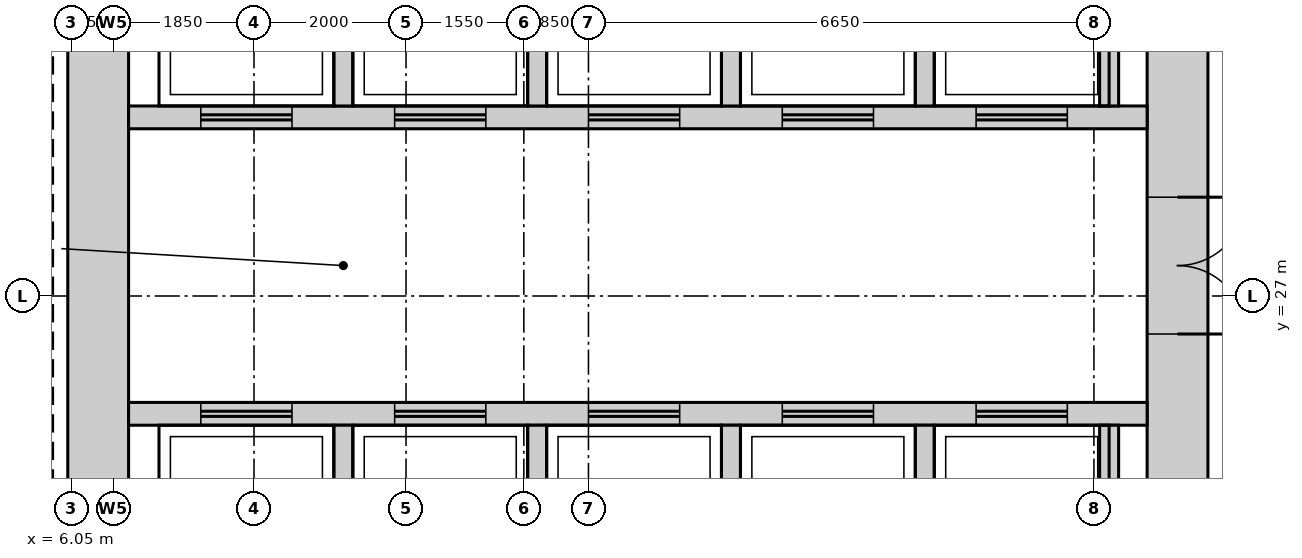
"""IFC4 building model, lengths in metres.
Left out: names, types, materials, properties, quantities, classifications, styles, units other than length and angle.
Written with IfcOpenShell. Run it as: python <this file> out.ifc"""

import sys

from ifc_helpers import new_model, si_unit, direction, frame, frame_2d, origin, place, context, subcontext, project, spatial, rectangle, extrude, source, transform, mapped, element, fill, save


model = new_model("IFC4")
c1 = context("Model", 3, precision=1e-05, world=origin(), true_north=direction((0.0, 1.0)))
c2 = subcontext(c1, "Body", "Model", "MODEL_VIEW")
j1 = project(units=[si_unit("LENGTHUNIT", "METRE"), si_unit("PLANEANGLEUNIT", "RADIAN")], contexts=[c1])
p1 = place(None, origin())
s1 = spatial("IfcSite", under=j1, at=p1, CompositionType="ELEMENT")
p2 = place(p1, origin())
s2 = spatial("IfcBuilding", under=s1, at=p2, CompositionType="ELEMENT")
p3 = place(p2, frame((0.0, 0.0, 176.7)))
s3 = spatial("IfcBuildingStorey", under=s2, at=p3, CompositionType="ELEMENT", Elevation=176.7)
m1 = source(origin(), c2, "Body", "SweptSolid", [
    extrude(rectangle(XDim=22.4, YDim=0.8, at=frame_2d((11.2, 0.0))), origin(), (0.0, 0.0, 1.0), 3.75),
])
p4 = place(p3, frame((20.6, 15.8, 0.0), z_axis=(0.0, 0.0, 1.0), x_axis=(0.0, 1.0, 0.0)))
e1 = element("IfcWall", 1, at=p4, inside=s3, PredefinedType="SHEAR", context=c2, shape_type="MappedRepresentation", body=[
    mapped(m1, transform((0.0, 0.0, 0.0))),
])
m2 = source(origin(), c2, "Body", "SweptSolid", [
    extrude(rectangle(XDim=1.8, YDim=2.1, at=frame_2d((0.9, 1.05))), frame((0.0, 0.41, 0.0), z_axis=(0.0, -1.0, 0.0), x_axis=(1.0, 0.0, 0.0)), (0.0, 0.0, 1.0), 0.82),
])
p5 = place(p4, frame((10.7, 0.0, 0.0)))
e2 = element("IfcOpeningElement", 2, at=p5, cuts=e1, PredefinedType="OPENING", context=c2, shape_type="MappedRepresentation", body=[
    mapped(m2, transform((0.0, 0.0, 0.0))),
])
m3 = source(origin(), c2, "Body", "SweptSolid", [
    extrude(rectangle(XDim=0.9, YDim=2.1, at=frame_2d((0.45, 1.05))), frame((0.0, 0.41, 0.0), z_axis=(0.0, -1.0, 0.0), x_axis=(1.0, 0.0, 0.0)), (0.0, 0.0, 1.0), 0.82),
])
p6 = place(p4, frame((0.35, 0.0, 0.0)))
e3 = element("IfcOpeningElement", 3, at=p6, cuts=e1, PredefinedType="OPENING", context=c2, shape_type="MappedRepresentation", body=[
    mapped(m3, transform((0.0, 0.0, 0.0))),
])
p7 = place(p4, frame((3.9, 0.0, 0.0)))
e4 = element("IfcOpeningElement", 4, at=p7, cuts=e1, PredefinedType="OPENING", context=c2, shape_type="MappedRepresentation", body=[
    mapped(m3, transform((0.0, 0.0, 0.0))),
])
p8 = place(p3, frame((6.4, 15.8, 0.0), z_axis=(0.0, 0.0, 1.0), x_axis=(0.0, 1.0, 0.0)))
e5 = element("IfcWall", 5, at=p8, inside=s3, PredefinedType="SHEAR", context=c2, shape_type="MappedRepresentation", body=[
    mapped(m1, transform((0.0, 0.0, 0.0))),
])
m4 = source(origin(), c2, "Body", "SweptSolid", [
    extrude(rectangle(XDim=13.4, YDim=0.3, at=frame_2d((6.7, 0.0))), origin(), (0.0, 0.0, 1.0), 3.75),
])
p9 = place(p3, frame((6.8, 29.35, 0.0), z_axis=(0.0, 0.0, 1.0), x_axis=(1.0, 0.0, 0.0)))
e6 = element("IfcWall", 6, at=p9, inside=s3, PredefinedType="STANDARD", context=c2, shape_type="MappedRepresentation", body=[
    mapped(m4, transform((0.0, 0.0, 0.0))),
])
m5 = source(origin(), c2, "Body", "SweptSolid", [
    extrude(rectangle(XDim=1.2, YDim=2.1, at=frame_2d((0.6, 1.05))), frame((0.0, 0.16, 0.0), z_axis=(0.0, -1.0, 0.0), x_axis=(1.0, 0.0, 0.0)), (0.0, 0.0, 1.0), 0.32),
])
p10 = place(p9, frame((0.95, 0.0, 0.0)))
e7 = element("IfcOpeningElement", 7, at=p10, cuts=e6, PredefinedType="OPENING", context=c2, shape_type="MappedRepresentation", body=[
    mapped(m5, transform((0.0, 0.0, 0.0))),
])
p11 = place(p9, frame((3.5, 0.0, 0.0)))
e8 = element("IfcOpeningElement", 8, at=p11, cuts=e6, PredefinedType="OPENING", context=c2, shape_type="MappedRepresentation", body=[
    mapped(m5, transform((0.0, 0.0, 0.0))),
])
p12 = place(p9, frame((6.05, 0.0, 0.0)))
e9 = element("IfcOpeningElement", 9, at=p12, cuts=e6, PredefinedType="OPENING", context=c2, shape_type="MappedRepresentation", body=[
    mapped(m5, transform((0.0, 0.0, 0.0))),
])
p13 = place(p9, frame((8.6, 0.0, 0.0)))
e10 = element("IfcOpeningElement", 10, at=p13, cuts=e6, PredefinedType="OPENING", context=c2, shape_type="MappedRepresentation", body=[
    mapped(m5, transform((0.0, 0.0, 0.0))),
])
p14 = place(p9, frame((11.15, 0.0, 0.0)))
e11 = element("IfcOpeningElement", 11, at=p14, cuts=e6, PredefinedType="OPENING", context=c2, shape_type="MappedRepresentation", body=[
    mapped(m5, transform((0.0, 0.0, 0.0))),
])
p15 = place(p3, frame((6.8, 25.45, 0.0), z_axis=(0.0, 0.0, 1.0), x_axis=(1.0, 0.0, 0.0)))
e12 = element("IfcWall", 12, at=p15, inside=s3, PredefinedType="STANDARD", context=c2, shape_type="MappedRepresentation", body=[
    mapped(m4, transform((0.0, 0.0, 0.0))),
])
p16 = place(p15, frame((0.95, 0.0, 0.0)))
e13 = element("IfcOpeningElement", 13, at=p16, cuts=e12, PredefinedType="OPENING", context=c2, shape_type="MappedRepresentation", body=[
    mapped(m5, transform((0.0, 0.0, 0.0))),
])
p17 = place(p15, frame((3.5, 0.0, 0.0)))
e14 = element("IfcOpeningElement", 14, at=p17, cuts=e12, PredefinedType="OPENING", context=c2, shape_type="MappedRepresentation", body=[
    mapped(m5, transform((0.0, 0.0, 0.0))),
])
p18 = place(p15, frame((6.05, 0.0, 0.0)))
e15 = element("IfcOpeningElement", 15, at=p18, cuts=e12, PredefinedType="OPENING", context=c2, shape_type="MappedRepresentation", body=[
    mapped(m5, transform((0.0, 0.0, 0.0))),
])
p19 = place(p15, frame((8.6, 0.0, 0.0)))
e16 = element("IfcOpeningElement", 16, at=p19, cuts=e12, PredefinedType="OPENING", context=c2, shape_type="MappedRepresentation", body=[
    mapped(m5, transform((0.0, 0.0, 0.0))),
])
p20 = place(p15, frame((11.15, 0.0, 0.0)))
e17 = element("IfcOpeningElement", 17, at=p20, cuts=e12, PredefinedType="OPENING", context=c2, shape_type="MappedRepresentation", body=[
    mapped(m5, transform((0.0, 0.0, 0.0))),
])
m6 = source(origin(), c2, "Body", "SweptSolid", [
    extrude(rectangle(XDim=2.4, YDim=0.25, at=frame_2d((1.2, 0.0))), origin(), (0.0, 0.0, 1.0), 3.75),
])
for number, where, z_axis, x_axis in (
    (18, (17.275, 29.5, 0.0), (0.0, 0.0, 1.0), (0.0, 1.0, 0.0)),
    (19, (19.7, 29.5, 0.0), (0.0, 0.0, 1.0), (0.0, 1.0, 0.0)),
    (20, (9.625, 29.5, 0.0), (0.0, 0.0, 1.0), (0.0, 1.0, 0.0)),
    (21, (12.175, 29.5, 0.0), (0.0, 0.0, 1.0), (0.0, 1.0, 0.0)),
    (22, (14.725, 29.5, 0.0), (0.0, 0.0, 1.0), (0.0, 1.0, 0.0)),
):
    element("IfcWall", number, at=place(p3, frame(where, z_axis=z_axis, x_axis=x_axis)), inside=s3, PredefinedType="STANDARD", context=c2, shape_type="MappedRepresentation", body=[
        mapped(m6, transform((0.0, 0.0, 0.0))),
    ])
m7 = source(origin(), c2, "Body", "SweptSolid", [
    extrude(rectangle(XDim=2.4, YDim=0.25, at=frame_2d((1.2, 0.0))), origin(), (0.0, 0.0, 1.0), 3.75),
])
for number, where, z_axis, x_axis in (
    (23, (17.275, 22.9, 0.0), (0.0, 0.0, 1.0), (0.0, 1.0, 0.0)),
    (24, (19.7, 22.9, 0.0), (0.0, 0.0, 1.0), (0.0, 1.0, 0.0)),
    (25, (9.625, 22.9, 0.0), (0.0, 0.0, 1.0), (0.0, 1.0, 0.0)),
    (26, (12.175, 22.9, 0.0), (0.0, 0.0, 1.0), (0.0, 1.0, 0.0)),
    (27, (14.725, 22.9, 0.0), (0.0, 0.0, 1.0), (0.0, 1.0, 0.0)),
):
    element("IfcWall", number, at=place(p3, frame(where, z_axis=z_axis, x_axis=x_axis)), inside=s3, PredefinedType="STANDARD", context=c2, shape_type="MappedRepresentation", body=[
        mapped(m7, transform((0.0, 0.0, 0.0))),
    ])
m8 = source(origin(), c2, "Body", "SweptSolid", [
    extrude(rectangle(XDim=1.8, YDim=2.1, at=frame_2d((0.9, 1.05))), frame((0.0, 0.35, 0.0), z_axis=(0.0, -1.0, 0.0), x_axis=(1.0, 0.0, 0.0)), (0.0, 0.0, 1.0), 0.7),
])
p21 = place(p5, origin())
e28 = element("IfcDoor", 28, at=p21, inside=s3, OperationType="DOUBLE_DOOR_SINGLE_SWING", PredefinedType="DOOR", context=c2, shape_type="MappedRepresentation", body=[
    mapped(m8, transform((0.0, 0.0, 0.0))),
])
fill(e2, e28)
m9 = source(origin(), c2, "Body", "SweptSolid", [
    extrude(rectangle(XDim=1.2, YDim=2.1, at=frame_2d((0.6, 1.05))), frame((0.0, 0.025, 0.0), z_axis=(0.0, -1.0, 0.0), x_axis=(1.0, 0.0, 0.0)), (0.0, 0.0, 1.0), 0.05),
])
p22 = place(p16, origin())
e29 = element("IfcDoor", 29, at=p22, inside=s3, OperationType="DOUBLE_DOOR_SLIDING", PredefinedType="DOOR", context=c2, shape_type="MappedRepresentation", body=[
    mapped(m9, transform((0.0, 0.0, 0.0))),
])
fill(e13, e29)
p23 = place(p17, origin())
e30 = element("IfcDoor", 30, at=p23, inside=s3, OperationType="DOUBLE_DOOR_SLIDING", PredefinedType="DOOR", context=c2, shape_type="MappedRepresentation", body=[
    mapped(m9, transform((0.0, 0.0, 0.0))),
])
fill(e14, e30)
p24 = place(p18, origin())
e31 = element("IfcDoor", 31, at=p24, inside=s3, OperationType="DOUBLE_DOOR_SLIDING", PredefinedType="DOOR", context=c2, shape_type="MappedRepresentation", body=[
    mapped(m9, transform((0.0, 0.0, 0.0))),
])
fill(e15, e31)
p25 = place(p19, origin())
e32 = element("IfcDoor", 32, at=p25, inside=s3, OperationType="DOUBLE_DOOR_SLIDING", PredefinedType="DOOR", context=c2, shape_type="MappedRepresentation", body=[
    mapped(m9, transform((0.0, 0.0, 0.0))),
])
fill(e16, e32)
p26 = place(p20, origin())
e33 = element("IfcDoor", 33, at=p26, inside=s3, OperationType="DOUBLE_DOOR_SLIDING", PredefinedType="DOOR", context=c2, shape_type="MappedRepresentation", body=[
    mapped(m9, transform((0.0, 0.0, 0.0))),
])
fill(e17, e33)
p27 = place(p10, origin())
e34 = element("IfcDoor", 34, at=p27, inside=s3, OperationType="DOUBLE_DOOR_SLIDING", PredefinedType="DOOR", context=c2, shape_type="MappedRepresentation", body=[
    mapped(m9, transform((0.0, 0.0, 0.0))),
])
fill(e7, e34)
p28 = place(p11, origin())
e35 = element("IfcDoor", 35, at=p28, inside=s3, OperationType="DOUBLE_DOOR_SLIDING", PredefinedType="DOOR", context=c2, shape_type="MappedRepresentation", body=[
    mapped(m9, transform((0.0, 0.0, 0.0))),
])
fill(e8, e35)
p29 = place(p12, origin())
e36 = element("IfcDoor", 36, at=p29, inside=s3, OperationType="DOUBLE_DOOR_SLIDING", PredefinedType="DOOR", context=c2, shape_type="MappedRepresentation", body=[
    mapped(m9, transform((0.0, 0.0, 0.0))),
])
fill(e9, e36)
p30 = place(p13, origin())
e37 = element("IfcDoor", 37, at=p30, inside=s3, OperationType="DOUBLE_DOOR_SLIDING", PredefinedType="DOOR", context=c2, shape_type="MappedRepresentation", body=[
    mapped(m9, transform((0.0, 0.0, 0.0))),
])
fill(e10, e37)
p31 = place(p14, origin())
e38 = element("IfcDoor", 38, at=p31, inside=s3, OperationType="DOUBLE_DOOR_SLIDING", PredefinedType="DOOR", context=c2, shape_type="MappedRepresentation", body=[
    mapped(m9, transform((0.0, 0.0, 0.0))),
])
fill(e11, e38)
save(model, sys.argv[1])
